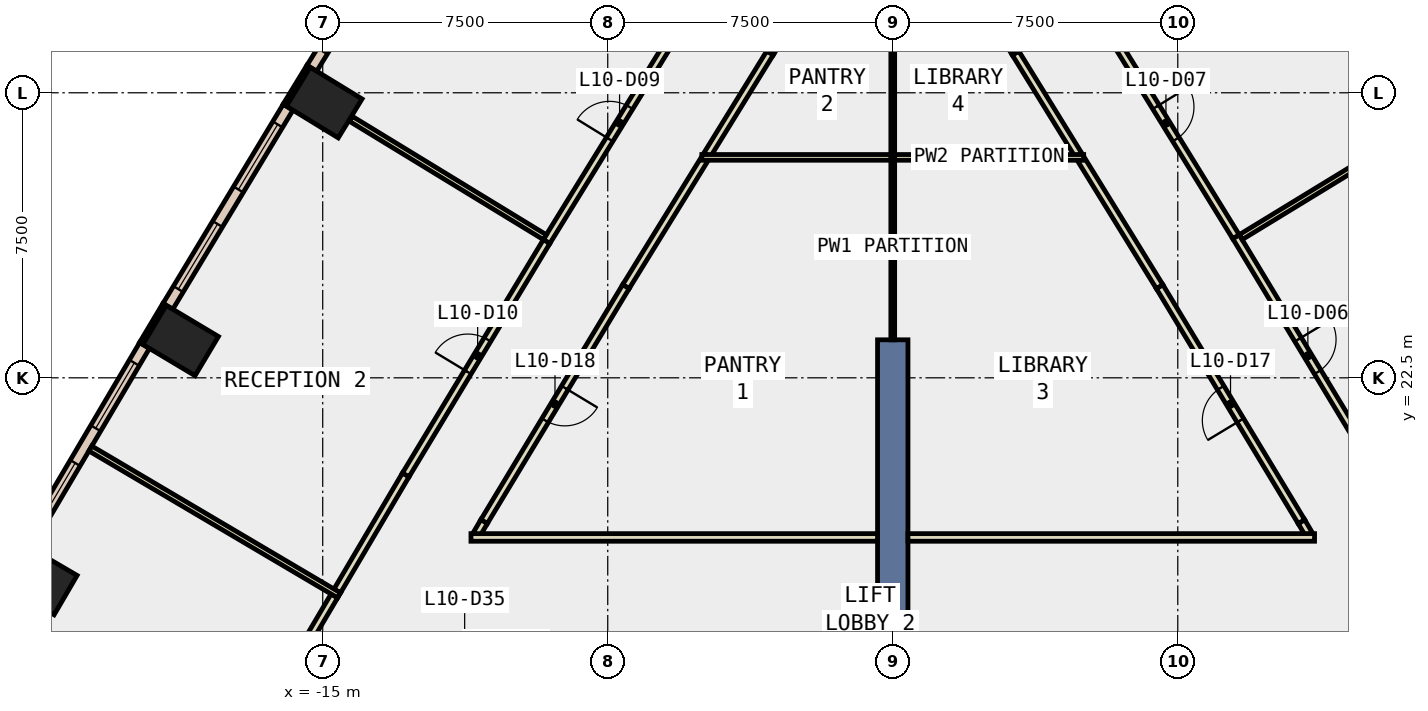
"""IFC4 building model, lengths in metres.
Left out: names, types, materials, properties, quantities, classifications, styles, units other than length and angle.
Written with IfcOpenShell. Run it as: python <this file> out.ifc"""

import sys

from ifc_helpers import new_model, si_unit, direction, frame, frame_2d, origin, origin_2d, place, context, subcontext, project, spatial, rectangle, extrude, element, fill, save


model = new_model("IFC4")
c1 = context("Model", 3, precision=1e-05, world=origin(), true_north=direction((0.0, 1.0)))
c2 = subcontext(c1, "Body", "Model", "MODEL_VIEW")
j1 = project(units=[si_unit("LENGTHUNIT", "METRE"), si_unit("PLANEANGLEUNIT", "RADIAN")], contexts=[c1])
p1 = place(None, origin())
s1 = spatial("IfcSite", under=j1, at=p1, CompositionType="ELEMENT")
p2 = place(p1, origin())
s2 = spatial("IfcBuilding", under=s1, at=p2, CompositionType="ELEMENT")
p3 = place(p2, frame((0.0, 0.0, 51.8)))
s3 = spatial("IfcBuildingStorey", under=s2, at=p3, CompositionType="ELEMENT", Elevation=51.8)
for number, where, z_axis, x_axis in (
    (1, (-14.961, 29.743, -0.4), (0.0, 0.0, 1.0), (0.522, 0.853, 0.0)),
    (2, (-18.739, 23.482, -0.4), (0.0, 0.0, 1.0), (0.513, 0.858, 0.0)),
    (3, (-22.457, 17.186, -0.4), (0.0, 0.0, 1.0), (0.504, 0.864, 0.0)),
):
    element("IfcColumn", number, at=place(p3, frame(where, z_axis=z_axis, x_axis=x_axis)), inside=s3, PredefinedType="COLUMN", context=c2, shape_type="SweptSolid", body=[
        extrude(rectangle(XDim=1.2, YDim=1.6, at=origin_2d()), origin(), (0.0, 0.0, 1.0), 4.2),
    ])
p4 = place(p3, frame((0.0, 14.5, -0.4), z_axis=(0.0, 0.0, 1.0), x_axis=(0.0, 1.0, 0.0)))
e4 = element("IfcWall", 4, at=p4, inside=s3, PredefinedType="SHEAR", context=c2, shape_type="SweptSolid", body=[
    extrude(rectangle(XDim=9.0, YDim=0.8, at=frame_2d((4.5, 0.0))), origin(), (0.0, 0.0, 1.0), 4.2),
])
for number, where, z_axis, x_axis in (
    (5, (-15.373, 30.698, 0.0), (0.0, 0.0, 1.0), (-0.522, -0.853, 0.0)),
    (6, (-19.161, 24.433, 0.0), (0.0, 0.0, 1.0), (-0.513, -0.858, 0.0)),
):
    element("IfcWall", number, at=place(p3, frame(where, z_axis=z_axis, x_axis=x_axis)), inside=s3, PredefinedType="STANDARD", context=c2, shape_type="SweptSolid", body=[
        extrude(rectangle(XDim=1.2, YDim=0.1, at=frame_2d((0.6, 0.0))), origin(), (0.0, 0.0, 1.0), 3.8),
    ])
p5 = place(p3, frame((15.287, 30.644, 0.0), z_axis=(0.0, 0.0, 1.0), x_axis=(-0.525114088226, 0.851031840971, 0.0)))
e7 = element("IfcWall", 7, at=p5, inside=s3, PredefinedType="STANDARD", context=c2, shape_type="SweptSolid", body=[
    extrude(rectangle(XDim=6.121, YDim=0.3, at=frame_2d((3.061, 0.0))), origin(), (0.0, 0.0, 1.0), 3.8),
])
p6 = place(p5, frame((0.53, 0.0, 0.9)))
e8 = element("IfcOpeningElement", 8, at=p6, cuts=e7, PredefinedType="OPENING", context=c2, shape_type="SweptSolid", body=[
    extrude(rectangle(XDim=2.0, YDim=2.6, at=frame_2d((1.0, 1.3))), frame((0.0, 0.16, 0.0), z_axis=(0.0, -1.0, 0.0), x_axis=(1.0, 0.0, 0.0)), (0.0, 0.0, 1.0), 0.32),
])
p7 = place(p5, frame((3.591, 0.0, 0.9)))
e9 = element("IfcOpeningElement", 9, at=p7, cuts=e7, PredefinedType="OPENING", context=c2, shape_type="SweptSolid", body=[
    extrude(rectangle(XDim=2.0, YDim=2.6, at=frame_2d((1.0, 1.3))), frame((0.0, 0.16, 0.0), z_axis=(0.0, -1.0, 0.0), x_axis=(1.0, 0.0, 0.0)), (0.0, 0.0, 1.0), 0.32),
])
p8 = place(p3, frame((-12.073, 35.853, 0.0), z_axis=(0.0, 0.0, 1.0), x_axis=(-0.525114088226, -0.851031840971, 0.0)))
e10 = element("IfcWall", 10, at=p8, inside=s3, PredefinedType="STANDARD", context=c2, shape_type="SweptSolid", body=[
    extrude(rectangle(XDim=6.121, YDim=0.3, at=frame_2d((3.061, 0.0))), origin(), (0.0, 0.0, 1.0), 3.8),
])
p9 = place(p8, frame((0.53, 0.0, 0.9)))
e11 = element("IfcOpeningElement", 11, at=p9, cuts=e10, PredefinedType="OPENING", context=c2, shape_type="SweptSolid", body=[
    extrude(rectangle(XDim=2.0, YDim=2.6, at=frame_2d((1.0, 1.3))), frame((0.0, 0.16, 0.0), z_axis=(0.0, -1.0, 0.0), x_axis=(1.0, 0.0, 0.0)), (0.0, 0.0, 1.0), 0.32),
])
p10 = place(p8, frame((3.591, 0.0, 0.9)))
e12 = element("IfcOpeningElement", 12, at=p10, cuts=e10, PredefinedType="OPENING", context=c2, shape_type="SweptSolid", body=[
    extrude(rectangle(XDim=2.0, YDim=2.6, at=frame_2d((1.0, 1.3))), frame((0.0, 0.16, 0.0), z_axis=(0.0, -1.0, 0.0), x_axis=(1.0, 0.0, 0.0)), (0.0, 0.0, 1.0), 0.32),
])
p11 = place(p3, frame((-15.911, 29.621, 0.0), z_axis=(0.0, 0.0, 1.0), x_axis=(-0.516699243123, -0.856166976796, 0.0)))
e13 = element("IfcWall", 13, at=p11, inside=s3, PredefinedType="STANDARD", context=c2, shape_type="SweptSolid", body=[
    extrude(rectangle(XDim=6.122, YDim=0.3, at=frame_2d((3.061, 0.0))), origin(), (0.0, 0.0, 1.0), 3.8),
])
p12 = place(p11, frame((0.53, 0.0, 0.9)))
e14 = element("IfcOpeningElement", 14, at=p12, cuts=e13, PredefinedType="OPENING", context=c2, shape_type="SweptSolid", body=[
    extrude(rectangle(XDim=2.0, YDim=2.6, at=frame_2d((1.0, 1.3))), frame((0.0, 0.16, 0.0), z_axis=(0.0, -1.0, 0.0), x_axis=(1.0, 0.0, 0.0)), (0.0, 0.0, 1.0), 0.32),
])
p13 = place(p11, frame((3.591, 0.0, 0.9)))
e15 = element("IfcOpeningElement", 15, at=p13, cuts=e13, PredefinedType="OPENING", context=c2, shape_type="SweptSolid", body=[
    extrude(rectangle(XDim=2.0, YDim=2.6, at=frame_2d((1.0, 1.3))), frame((0.0, 0.16, 0.0), z_axis=(0.0, -1.0, 0.0), x_axis=(1.0, 0.0, 0.0)), (0.0, 0.0, 1.0), 0.32),
])
p14 = place(p3, frame((-19.688, 23.351, 0.0), z_axis=(0.0, 0.0, 1.0), x_axis=(-0.508412153373, -0.861113861404, 0.0)))
e16 = element("IfcWall", 16, at=p14, inside=s3, PredefinedType="STANDARD", context=c2, shape_type="SweptSolid", body=[
    extrude(rectangle(XDim=6.121, YDim=0.3, at=frame_2d((3.061, 0.0))), origin(), (0.0, 0.0, 1.0), 3.8),
])
p15 = place(p14, frame((0.53, 0.0, 0.9)))
e17 = element("IfcOpeningElement", 17, at=p15, cuts=e16, PredefinedType="OPENING", context=c2, shape_type="SweptSolid", body=[
    extrude(rectangle(XDim=2.0, YDim=2.6, at=frame_2d((1.0, 1.3))), frame((0.0, 0.16, 0.0), z_axis=(0.0, -1.0, 0.0), x_axis=(1.0, 0.0, 0.0)), (0.0, 0.0, 1.0), 0.32),
])
p16 = place(p14, frame((3.591, 0.0, 0.9)))
e18 = element("IfcOpeningElement", 18, at=p16, cuts=e16, PredefinedType="OPENING", context=c2, shape_type="SweptSolid", body=[
    extrude(rectangle(XDim=2.0, YDim=2.6, at=frame_2d((1.0, 1.3))), frame((0.0, 0.16, 0.0), z_axis=(0.0, -1.0, 0.0), x_axis=(1.0, 0.0, 0.0)), (0.0, 0.0, 1.0), 0.32),
])
p17 = place(p3, frame((10.948, 18.386, 0.0), z_axis=(0.0, 0.0, 1.0), x_axis=(-0.506880801681, 0.862016155815, 0.0)))
e19 = element("IfcWall", 19, at=p17, inside=s3, PredefinedType="PARTITIONING", context=c2, shape_type="SweptSolid", body=[
    extrude(rectangle(XDim=0.383, YDim=0.2, at=frame_2d((0.191, 0.0))), origin(), (0.0, 0.0, 1.0), 3.8),
])
p18 = place(p3, frame((10.754, 18.716, 0.0), z_axis=(0.0, 0.0, 1.0), x_axis=(-0.516755973305, 0.856132737403, 0.0)))
e20 = element("IfcWall", 20, at=p18, inside=s3, PredefinedType="PARTITIONING", context=c2, shape_type="SweptSolid", body=[
    extrude(rectangle(XDim=7.222, YDim=0.2, at=frame_2d((3.611, 0.0))), origin(), (0.0, 0.0, 1.0), 3.8),
])
p19 = place(p18, frame((3.111, 0.0, 0.0)))
e21 = element("IfcOpeningElement", 21, at=p19, cuts=e20, PredefinedType="OPENING", context=c2, shape_type="SweptSolid", body=[
    extrude(rectangle(XDim=1.0, YDim=2.1, at=frame_2d((0.5, 1.05))), frame((0.0, 0.11, 0.0), z_axis=(0.0, -1.0, 0.0), x_axis=(1.0, 0.0, 0.0)), (0.0, 0.0, 1.0), 0.22),
])
for number, where, z_axis, x_axis in (
    (22, (7.022, 24.899, 0.0), (0.0, 0.0, 1.0), (-0.525, 0.851, 0.0)),
    (23, (-4.963, 28.236, 0.0), (0.0, 0.0, 1.0), (-0.525, -0.851, 0.0)),
):
    element("IfcWall", number, at=place(p3, frame(where, z_axis=z_axis, x_axis=x_axis)), inside=s3, PredefinedType="PARTITIONING", context=c2, shape_type="SweptSolid", body=[
        extrude(rectangle(XDim=3.921, YDim=0.2, at=frame_2d((1.961, 0.0))), origin(), (0.0, 0.0, 1.0), 3.8),
    ])
p20 = place(p3, frame((-7.022, 24.899, 0.0), z_axis=(0.0, 0.0, 1.0), x_axis=(-0.516755973305, -0.856132737403, 0.0)))
e24 = element("IfcWall", 24, at=p20, inside=s3, PredefinedType="PARTITIONING", context=c2, shape_type="SweptSolid", body=[
    extrude(rectangle(XDim=7.222, YDim=0.2, at=frame_2d((3.611, 0.0))), origin(), (0.0, 0.0, 1.0), 3.8),
])
p21 = place(p20, frame((3.111, 0.0, 0.0)))
e25 = element("IfcOpeningElement", 25, at=p21, cuts=e24, PredefinedType="OPENING", context=c2, shape_type="SweptSolid", body=[
    extrude(rectangle(XDim=1.0, YDim=2.1, at=frame_2d((0.5, 1.05))), frame((0.0, 0.11, 0.0), z_axis=(0.0, -1.0, 0.0), x_axis=(1.0, 0.0, 0.0)), (0.0, 0.0, 1.0), 0.22),
])
p22 = place(p3, frame((-10.754, 18.716, 0.0), z_axis=(0.0, 0.0, 1.0), x_axis=(-0.506880801681, -0.862016155815, 0.0)))
e26 = element("IfcWall", 26, at=p22, inside=s3, PredefinedType="PARTITIONING", context=c2, shape_type="SweptSolid", body=[
    extrude(rectangle(XDim=0.383, YDim=0.2, at=frame_2d((0.191, 0.0))), origin(), (0.0, 0.0, 1.0), 3.8),
])
p23 = place(p3, frame((4.885, 28.364, 0.0), z_axis=(0.0, 0.0, 1.0), x_axis=(-0.525078663571, 0.851053698107, 0.0)))
e27 = element("IfcWall", 27, at=p23, inside=s3, PredefinedType="PARTITIONING", context=c2, shape_type="SweptSolid", body=[
    extrude(rectangle(XDim=3.15, YDim=0.2, at=frame_2d((1.575, 0.0))), origin(), (0.0, 0.0, 1.0), 3.8),
])
p24 = place(p3, frame((3.231, 31.045, 0.0), z_axis=(0.0, 0.0, 1.0), x_axis=(-0.533294550084, 0.845929620507, 0.0)))
e28 = element("IfcWall", 28, at=p24, inside=s3, PredefinedType="PARTITIONING", context=c2, shape_type="SweptSolid", body=[
    extrude(rectangle(XDim=5.959, YDim=0.2, at=frame_2d((2.979, 0.0))), origin(), (0.0, 0.0, 1.0), 3.8),
])
p25 = place(p24, frame((2.479, 0.0, 0.0)))
e29 = element("IfcOpeningElement", 29, at=p25, cuts=e28, PredefinedType="OPENING", context=c2, shape_type="SweptSolid", body=[
    extrude(rectangle(XDim=1.0, YDim=2.1, at=frame_2d((0.5, 1.05))), frame((0.0, 0.11, 0.0), z_axis=(0.0, -1.0, 0.0), x_axis=(1.0, 0.0, 0.0)), (0.0, 0.0, 1.0), 0.22),
])
p26 = place(p3, frame((0.027, 36.213, 0.0), z_axis=(0.0, 0.0, 1.0), x_axis=(-0.533299680037, -0.845926386438, 0.0)))
e30 = element("IfcWall", 30, at=p26, inside=s3, PredefinedType="PARTITIONING", context=c2, shape_type="SweptSolid", body=[
    extrude(rectangle(XDim=6.109, YDim=0.2, at=frame_2d((3.055, 0.0))), origin(), (0.0, 0.0, 1.0), 3.8),
])
p27 = place(p26, frame((2.554, 0.0, 0.0)))
e31 = element("IfcOpeningElement", 31, at=p27, cuts=e30, PredefinedType="OPENING", context=c2, shape_type="SweptSolid", body=[
    extrude(rectangle(XDim=1.0, YDim=2.1, at=frame_2d((0.5, 1.05))), frame((0.0, 0.11, 0.0), z_axis=(0.0, -1.0, 0.0), x_axis=(1.0, 0.0, 0.0)), (0.0, 0.0, 1.0), 0.22),
])
p28 = place(p3, frame((-3.231, 31.045, 0.0), z_axis=(0.0, 0.0, 1.0), x_axis=(-0.525078663571, -0.851053698107, 0.0)))
e32 = element("IfcWall", 32, at=p28, inside=s3, PredefinedType="PARTITIONING", context=c2, shape_type="SweptSolid", body=[
    extrude(rectangle(XDim=3.15, YDim=0.2, at=frame_2d((1.575, 0.0))), origin(), (0.0, 0.0, 1.0), 3.8),
])
p29 = place(p3, frame((9.032, 26.213, 0.0), z_axis=(0.0, 0.0, 1.0), x_axis=(0.516789314756, -0.856112611841, 0.0)))
e33 = element("IfcWall", 33, at=p29, inside=s3, PredefinedType="PARTITIONING", context=c2, shape_type="SweptSolid", body=[
    extrude(rectangle(XDim=7.32, YDim=0.2, at=frame_2d((3.66, 0.0))), origin(), (0.0, 0.0, 1.0), 3.8),
])
p30 = place(p29, frame((3.16, 0.0, 0.0)))
e34 = element("IfcOpeningElement", 34, at=p30, cuts=e33, PredefinedType="OPENING", context=c2, shape_type="SweptSolid", body=[
    extrude(rectangle(XDim=1.0, YDim=2.1, at=frame_2d((0.5, 1.05))), frame((0.0, 0.11, 0.0), z_axis=(0.0, -1.0, 0.0), x_axis=(1.0, 0.0, 0.0)), (0.0, 0.0, 1.0), 0.22),
])
p31 = place(p3, frame((5.267, 32.315, 0.0), z_axis=(0.0, 0.0, 1.0), x_axis=(0.524988204957, -0.851109502153, 0.0)))
e35 = element("IfcWall", 35, at=p31, inside=s3, PredefinedType="PARTITIONING", context=c2, shape_type="SweptSolid", body=[
    extrude(rectangle(XDim=7.169, YDim=0.2, at=frame_2d((3.585, 0.0))), origin(), (0.0, 0.0, 1.0), 3.8),
])
p32 = place(p31, frame((3.16, 0.0, 0.0)))
e36 = element("IfcOpeningElement", 36, at=p32, cuts=e35, PredefinedType="OPENING", context=c2, shape_type="SweptSolid", body=[
    extrude(rectangle(XDim=1.0, YDim=2.1, at=frame_2d((0.5, 1.05))), frame((0.0, 0.11, 0.0), z_axis=(0.0, -1.0, 0.0), x_axis=(1.0, 0.0, 0.0)), (0.0, 0.0, 1.0), 0.22),
])
p33 = place(p3, frame((-9.11, 26.085, 0.0), z_axis=(0.0, 0.0, 1.0), x_axis=(0.525007100846, 0.85109784635, 0.0)))
e37 = element("IfcWall", 37, at=p33, inside=s3, PredefinedType="PARTITIONING", context=c2, shape_type="SweptSolid", body=[
    extrude(rectangle(XDim=7.32, YDim=0.2, at=frame_2d((3.66, 0.0))), origin(), (0.0, 0.0, 1.0), 3.8),
])
p34 = place(p33, frame((3.16, 0.0, 0.0)))
e38 = element("IfcOpeningElement", 38, at=p34, cuts=e37, PredefinedType="OPENING", context=c2, shape_type="SweptSolid", body=[
    extrude(rectangle(XDim=1.0, YDim=2.1, at=frame_2d((0.5, 1.05))), frame((0.0, 0.11, 0.0), z_axis=(0.0, -1.0, 0.0), x_axis=(1.0, 0.0, 0.0)), (0.0, 0.0, 1.0), 0.22),
])
p35 = place(p3, frame((-14.618, 16.891, 0.0), z_axis=(0.0, 0.0, 1.0), x_axis=(0.508267810274, 0.861199067022, 0.0)))
e39 = element("IfcWall", 39, at=p35, inside=s3, PredefinedType="PARTITIONING", context=c2, shape_type="SweptSolid", body=[
    extrude(rectangle(XDim=3.547, YDim=0.2, at=frame_2d((1.774, 0.0))), origin(), (0.0, 0.0, 1.0), 3.8),
])
p36 = place(p3, frame((-12.815, 19.946, 0.0), z_axis=(0.0, 0.0, 1.0), x_axis=(0.516822021522, 0.856092867667, 0.0)))
e40 = element("IfcWall", 40, at=p36, inside=s3, PredefinedType="PARTITIONING", context=c2, shape_type="SweptSolid", body=[
    extrude(rectangle(XDim=7.171, YDim=0.2, at=frame_2d((3.585, 0.0))), origin(), (0.0, 0.0, 1.0), 3.8),
])
p37 = place(p36, frame((3.16, 0.0, 0.0)))
e41 = element("IfcOpeningElement", 41, at=p37, cuts=e40, PredefinedType="OPENING", context=c2, shape_type="SweptSolid", body=[
    extrude(rectangle(XDim=1.0, YDim=2.1, at=frame_2d((0.5, 1.05))), frame((0.0, 0.11, 0.0), z_axis=(0.0, -1.0, 0.0), x_axis=(1.0, 0.0, 0.0)), (0.0, 0.0, 1.0), 0.22),
])
p38 = place(p3, frame((-16.498, 13.707, 0.0), z_axis=(0.0, 0.0, 1.0), x_axis=(0.508471945541, 0.861078556578, 0.0)))
e42 = element("IfcWall", 42, at=p38, inside=s3, PredefinedType="PARTITIONING", context=c2, shape_type="SweptSolid", body=[
    extrude(rectangle(XDim=3.548, YDim=0.2, at=frame_2d((1.774, 0.0))), origin(), (0.0, 0.0, 1.0), 3.8),
])
for number, where, z_axis, x_axis in (
    (43, (0.4, 18.3, 0.0), (0.0, 0.0, 1.0), (1.0, 0.0, 0.0)),
    (44, (-11.099, 18.3, 0.0), (0.0, 0.0, 1.0), (1.0, 0.0, 0.0)),
):
    element("IfcWall", number, at=place(p3, frame(where, z_axis=z_axis, x_axis=x_axis)), inside=s3, PredefinedType="PARTITIONING", context=c2, shape_type="SweptSolid", body=[
        extrude(rectangle(XDim=10.699, YDim=0.2, at=frame_2d((5.35, 0.0))), origin(), (0.0, 0.0, 1.0), 3.8),
    ])
p39 = place(p3, frame((0.0, 23.5, 0.0), z_axis=(0.0, 0.0, 1.0), x_axis=(0.0, 1.0, 0.0)))
e45 = element("IfcWall", 45, at=p39, inside=s3, PredefinedType="PARTITIONING", context=c2, shape_type="SweptSolid", body=[
    extrude(rectangle(XDim=4.875, YDim=0.1, at=frame_2d((2.438, 0.0))), origin(), (0.0, 0.0, 1.0), 3.8),
])
for number, where, z_axis, x_axis in (
    (46, (0.05, 28.3, 0.0), (0.0, 0.0, 1.0), (1.0, 0.0, 0.0)),
    (47, (-5.024, 28.3, 0.0), (0.0, 0.0, 1.0), (1.0, 0.0, 0.0)),
):
    element("IfcWall", number, at=place(p3, frame(where, z_axis=z_axis, x_axis=x_axis)), inside=s3, PredefinedType="PARTITIONING", context=c2, shape_type="SweptSolid", body=[
        extrude(rectangle(XDim=4.974, YDim=0.15, at=frame_2d((2.487, 0.0))), origin(), (0.0, 0.0, 1.0), 3.8),
    ])
p40 = place(p3, frame((0.0, 28.375, 0.0), z_axis=(0.0, 0.0, 1.0), x_axis=(0.0, 1.0, 0.0)))
e48 = element("IfcWall", 48, at=p40, inside=s3, PredefinedType="PARTITIONING", context=c2, shape_type="SweptSolid", body=[
    extrude(rectangle(XDim=7.895, YDim=0.1, at=frame_2d((3.948, 0.0))), origin(), (0.0, 0.0, 1.0), 3.8),
])
for number, where, z_axis, x_axis in (
    (49, (9.156, 26.201, 0.0), (0.0, 0.0, 1.0), (0.854, 0.521, 0.0)),
    (50, (-9.156, 26.201, 0.0), (0.0, 0.0, 1.0), (-0.854, 0.521, 0.0)),
):
    element("IfcWall", number, at=place(p3, frame(where, z_axis=z_axis, x_axis=x_axis)), inside=s3, PredefinedType="PARTITIONING", context=c2, shape_type="SweptSolid", body=[
        extrude(rectangle(XDim=5.98, YDim=0.15, at=frame_2d((2.99, 0.0))), origin(), (0.0, 0.0, 1.0), 3.8),
    ])
p41 = place(p3, frame((-14.57, 16.776, 0.0), z_axis=(0.0, 0.0, 1.0), x_axis=(-0.861124703857, 0.508393788718, 0.0)))
e51 = element("IfcWall", 51, at=p41, inside=s3, PredefinedType="PARTITIONING", context=c2, shape_type="SweptSolid", body=[
    extrude(rectangle(XDim=7.6, YDim=0.15, at=frame_2d((3.8, 0.0))), origin(), (0.0, 0.0, 1.0), 3.8),
])
p42 = place(p12, origin())
e52 = element("IfcWindow", 52, at=p42, inside=s3, PartitioningType="SINGLE_PANEL", PredefinedType="WINDOW", context=c2, shape_type="SweptSolid", body=[
    extrude(rectangle(XDim=2.0, YDim=2.6, at=frame_2d((1.0, 1.3))), frame((0.0, 0.03, 0.0), z_axis=(0.0, -1.0, 0.0), x_axis=(1.0, 0.0, 0.0)), (0.0, 0.0, 1.0), 0.06),
])
fill(e14, e52)
p43 = place(p13, origin())
e53 = element("IfcWindow", 53, at=p43, inside=s3, PartitioningType="SINGLE_PANEL", PredefinedType="WINDOW", context=c2, shape_type="SweptSolid", body=[
    extrude(rectangle(XDim=2.0, YDim=2.6, at=frame_2d((1.0, 1.3))), frame((0.0, 0.03, 0.0), z_axis=(0.0, -1.0, 0.0), x_axis=(1.0, 0.0, 0.0)), (0.0, 0.0, 1.0), 0.06),
])
fill(e15, e53)
p44 = place(p15, origin())
e54 = element("IfcWindow", 54, at=p44, inside=s3, PartitioningType="SINGLE_PANEL", PredefinedType="WINDOW", context=c2, shape_type="SweptSolid", body=[
    extrude(rectangle(XDim=2.0, YDim=2.6, at=frame_2d((1.0, 1.3))), frame((0.0, 0.03, 0.0), z_axis=(0.0, -1.0, 0.0), x_axis=(1.0, 0.0, 0.0)), (0.0, 0.0, 1.0), 0.06),
])
fill(e17, e54)
p45 = place(p16, origin())
e55 = element("IfcWindow", 55, at=p45, inside=s3, PartitioningType="SINGLE_PANEL", PredefinedType="WINDOW", context=c2, shape_type="SweptSolid", body=[
    extrude(rectangle(XDim=2.0, YDim=2.6, at=frame_2d((1.0, 1.3))), frame((0.0, 0.03, 0.0), z_axis=(0.0, -1.0, 0.0), x_axis=(1.0, 0.0, 0.0)), (0.0, 0.0, 1.0), 0.06),
])
fill(e18, e55)
p46 = place(p30, origin())
e56 = element("IfcDoor", 56, at=p46, inside=s3, OperationType="SINGLE_SWING_LEFT", PredefinedType="DOOR", context=c2, shape_type="SweptSolid", body=[
    extrude(rectangle(XDim=1.0, YDim=2.1, at=frame_2d((0.5, 1.05))), frame((0.0, 0.025, 0.0), z_axis=(0.0, -1.0, 0.0), x_axis=(1.0, 0.0, 0.0)), (0.0, 0.0, 1.0), 0.05),
])
fill(e34, e56)
p47 = place(p32, origin())
e57 = element("IfcDoor", 57, at=p47, inside=s3, OperationType="SINGLE_SWING_RIGHT", PredefinedType="DOOR", context=c2, shape_type="SweptSolid", body=[
    extrude(rectangle(XDim=1.0, YDim=2.1, at=frame_2d((0.5, 1.05))), frame((0.0, 0.025, 0.0), z_axis=(0.0, -1.0, 0.0), x_axis=(1.0, 0.0, 0.0)), (0.0, 0.0, 1.0), 0.05),
])
fill(e36, e57)
p48 = place(p34, origin())
e58 = element("IfcDoor", 58, at=p48, inside=s3, OperationType="SINGLE_SWING_RIGHT", PredefinedType="DOOR", context=c2, shape_type="SweptSolid", body=[
    extrude(rectangle(XDim=1.0, YDim=2.1, at=frame_2d((0.5, 1.05))), frame((0.0, 0.025, 0.0), z_axis=(0.0, -1.0, 0.0), x_axis=(1.0, 0.0, 0.0)), (0.0, 0.0, 1.0), 0.05),
])
fill(e38, e58)
p49 = place(p37, origin())
e59 = element("IfcDoor", 59, at=p49, inside=s3, OperationType="SINGLE_SWING_LEFT", PredefinedType="DOOR", context=c2, shape_type="SweptSolid", body=[
    extrude(rectangle(XDim=1.0, YDim=2.1, at=frame_2d((0.5, 1.05))), frame((0.0, 0.025, 0.0), z_axis=(0.0, -1.0, 0.0), x_axis=(1.0, 0.0, 0.0)), (0.0, 0.0, 1.0), 0.05),
])
fill(e41, e59)
p50 = place(p19, origin())
e60 = element("IfcDoor", 60, at=p50, inside=s3, OperationType="SINGLE_SWING_LEFT", PredefinedType="DOOR", context=c2, shape_type="SweptSolid", body=[
    extrude(rectangle(XDim=1.0, YDim=2.1, at=frame_2d((0.5, 1.05))), frame((0.0, 0.025, 0.0), z_axis=(0.0, -1.0, 0.0), x_axis=(1.0, 0.0, 0.0)), (0.0, 0.0, 1.0), 0.05),
])
fill(e21, e60)
p51 = place(p21, origin())
e61 = element("IfcDoor", 61, at=p51, inside=s3, OperationType="SINGLE_SWING_LEFT", PredefinedType="DOOR", context=c2, shape_type="SweptSolid", body=[
    extrude(rectangle(XDim=1.0, YDim=2.1, at=frame_2d((0.5, 1.05))), frame((0.0, 0.025, 0.0), z_axis=(0.0, -1.0, 0.0), x_axis=(1.0, 0.0, 0.0)), (0.0, 0.0, 1.0), 0.05),
])
fill(e25, e61)
save(model, sys.argv[1])
